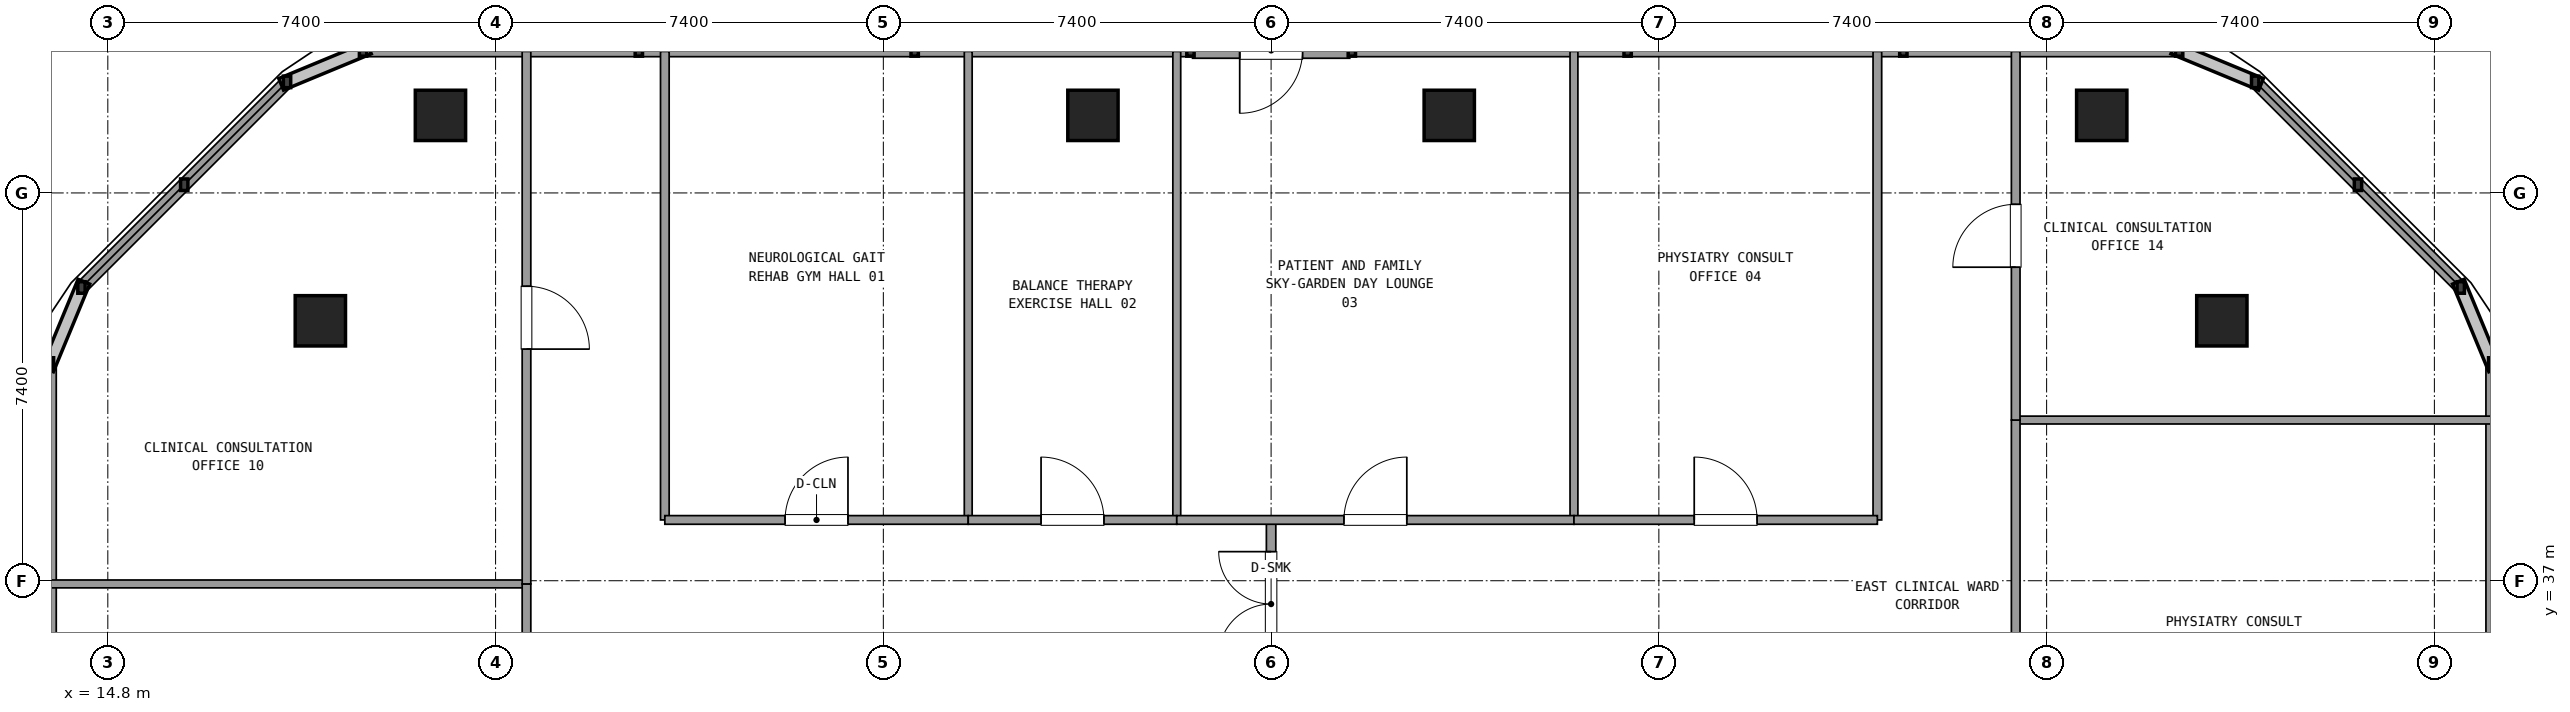
"""IFC4 building model, lengths in metres.
Left out: names, types, materials, properties, quantities, classifications, styles, units other than length and angle.
Written with IfcOpenShell. Run it as: python <this file> out.ifc"""

import sys

from ifc_helpers import new_model, si_unit, direction, frame, frame_2d, origin, origin_2d, place, context, subcontext, project, spatial, rectangle, extrude, element, fill, save


model = new_model("IFC4")
c1 = context("Model", 3, precision=1e-05, world=origin(), true_north=direction((0.0, 1.0)))
c2 = subcontext(c1, "Body", "Model", "MODEL_VIEW")
j1 = project(units=[si_unit("LENGTHUNIT", "METRE"), si_unit("PLANEANGLEUNIT", "RADIAN")], contexts=[c1])
p1 = place(None, origin())
s1 = spatial("IfcSite", under=j1, at=p1, CompositionType="ELEMENT")
p2 = place(p1, origin())
s2 = spatial("IfcBuilding", under=s1, at=p2, CompositionType="ELEMENT")
p3 = place(p2, frame((0.0, 0.0, 167.22)))
s3 = spatial("IfcBuildingStorey", under=s2, at=p3, CompositionType="ELEMENT", Elevation=167.22)
for number, where, z_axis, x_axis in (
    (1, (55.144, 41.96, 0.0), (0.0, 0.0, 1.0), (1.0, 0.0, 0.0)),
    (2, (52.852, 45.88, 0.0), (0.0, 0.0, 1.0), (1.0, 0.0, 0.0)),
    (3, (40.4, 45.88, 0.0), (0.0, 0.0, 1.0), (1.0, 0.0, 0.0)),
    (4, (33.6, 45.88, 0.0), (0.0, 0.0, 1.0), (1.0, 0.0, 0.0)),
    (5, (21.148, 45.88, 0.0), (0.0, 0.0, 1.0), (1.0, 0.0, 0.0)),
    (6, (18.856, 41.96, 0.0), (0.0, 0.0, 1.0), (1.0, 0.0, 0.0)),
):
    element("IfcColumn", number, at=place(p3, frame(where, z_axis=z_axis, x_axis=x_axis)), inside=s3, PredefinedType="COLUMN", context=c2, shape_type="SweptSolid", body=[
        extrude(rectangle(XDim=0.96, YDim=0.96, at=origin_2d()), origin(), (0.0, 0.0, 1.0), 3.6),
    ])
p4 = place(p3, frame((60.304, 10.655, 0.0), z_axis=(0.0, 0.0, 1.0), x_axis=(0.0, 1.0, 0.0)))
e7 = element("IfcWall", 7, at=p4, inside=s3, PredefinedType="SOLIDWALL", context=c2, shape_type="SweptSolid", body=[
    extrude(rectangle(XDim=30.49, YDim=0.24, at=frame_2d((15.245, 0.0))), origin(), (0.0, 0.0, 1.0), 0.85),
])
p5 = place(p3, frame((59.703, 42.596, 0.0), z_axis=(0.0, 0.0, 1.0), x_axis=(-0.707084777957, 0.707128783731, 0.0)))
e8 = element("IfcWall", 8, at=p5, inside=s3, PredefinedType="SOLIDWALL", context=c2, shape_type="SweptSolid", body=[
    extrude(rectangle(XDim=5.548, YDim=0.24, at=frame_2d((2.774, 0.0))), origin(), (0.0, 0.0, 1.0), 0.85),
])
p6 = place(p3, frame((38.501, 47.12, 0.0), z_axis=(0.0, 0.0, 1.0), x_axis=(-1.0, 0.0, 0.0)))
e9 = element("IfcWall", 9, at=p6, inside=s3, PredefinedType="SOLIDWALL", context=c2, shape_type="SweptSolid", body=[
    extrude(rectangle(XDim=3.0, YDim=0.3, at=frame_2d((1.5, 0.0))), origin(), (0.0, 0.0, 1.0), 2.67),
])
p7 = place(p6, frame((0.9, 0.0, 0.0)))
e10 = element("IfcOpeningElement", 10, at=p7, cuts=e9, PredefinedType="OPENING", context=c2, shape_type="SweptSolid", body=[
    extrude(rectangle(XDim=1.2, YDim=2.2, at=frame_2d((0.6, 1.1))), frame((0.0, 0.16, 0.0), z_axis=(0.0, -1.0, 0.0), x_axis=(1.0, 0.0, 0.0)), (0.0, 0.0, 1.0), 0.32),
])
p8 = place(p3, frame((54.329, 47.12, 0.0), z_axis=(0.0, 0.0, 1.0), x_axis=(-1.0, 0.0, 0.0)))
e11 = element("IfcWall", 11, at=p8, inside=s3, PredefinedType="SOLIDWALL", context=c2, shape_type="SweptSolid", body=[
    extrude(rectangle(XDim=15.788, YDim=0.24, at=frame_2d((7.894, 0.0))), origin(), (0.0, 0.0, 1.0), 0.85),
])
p9 = place(p3, frame((35.461, 47.12, 0.0), z_axis=(0.0, 0.0, 1.0), x_axis=(-1.0, 0.0, 0.0)))
e12 = element("IfcWall", 12, at=p9, inside=s3, PredefinedType="SOLIDWALL", context=c2, shape_type="SweptSolid", body=[
    extrude(rectangle(XDim=15.79, YDim=0.24, at=frame_2d((7.895, 0.0))), origin(), (0.0, 0.0, 1.0), 0.85),
])
p10 = place(p3, frame((18.22, 46.519, 0.0), z_axis=(0.0, 0.0, 1.0), x_axis=(-0.707084777957, -0.707128783731, 0.0)))
e13 = element("IfcWall", 13, at=p10, inside=s3, PredefinedType="SOLIDWALL", context=c2, shape_type="SweptSolid", body=[
    extrude(rectangle(XDim=5.548, YDim=0.24, at=frame_2d((2.774, 0.0))), origin(), (0.0, 0.0, 1.0), 0.85),
])
p11 = place(p3, frame((13.696, 41.145, 0.0), z_axis=(0.0, 0.0, 1.0), x_axis=(0.0, -1.0, 0.0)))
e14 = element("IfcWall", 14, at=p11, inside=s3, PredefinedType="SOLIDWALL", context=c2, shape_type="SweptSolid", body=[
    extrude(rectangle(XDim=30.49, YDim=0.24, at=frame_2d((15.245, 0.0))), origin(), (0.0, 0.0, 1.0), 0.85),
])
p12 = place(p3, frame((37.0, 34.95, 0.0), z_axis=(0.0, 0.0, 1.0), x_axis=(0.0, 1.0, 0.0)))
e15 = element("IfcWall", 15, at=p12, inside=s3, PredefinedType="PARTITIONING", context=c2, shape_type="SweptSolid", body=[
    extrude(rectangle(XDim=3.21, YDim=0.18, at=frame_2d((1.605, 0.0))), origin(), (0.0, 0.0, 1.0), 2.61),
])
p13 = place(p12, frame((0.605, 0.0, 0.0)))
e16 = element("IfcOpeningElement", 16, at=p13, cuts=e15, PredefinedType="OPENING", context=c2, shape_type="SweptSolid", body=[
    extrude(rectangle(XDim=2.0, YDim=2.2, at=frame_2d((1.0, 1.1))), frame((0.0, 0.1, 0.0), z_axis=(0.0, -1.0, 0.0), x_axis=(1.0, 0.0, 0.0)), (0.0, 0.0, 1.0), 0.2),
])
for number, where, z_axis, x_axis in (
    (17, (25.43, 38.16, 0.0), (0.0, 0.0, 1.0), (0.0, 1.0, 0.0)),
    (18, (48.57, 38.16, 0.0), (0.0, 0.0, 1.0), (0.0, 1.0, 0.0)),
):
    element("IfcWall", number, at=place(p3, frame(where, z_axis=z_axis, x_axis=x_axis)), inside=s3, PredefinedType="PARTITIONING", context=c2, shape_type="SweptSolid", body=[
        extrude(rectangle(XDim=8.94, YDim=0.165, at=frame_2d((4.47, 0.0))), origin(), (0.0, 0.0, 1.0), 2.61),
    ])
p14 = place(p3, frame((31.22, 38.16, 0.0), z_axis=(0.0, 0.0, 1.0), x_axis=(0.0, 1.0, 0.0)))
e19 = element("IfcWall", 19, at=p14, inside=s3, PredefinedType="PARTITIONING", context=c2, shape_type="SweptSolid", body=[
    extrude(rectangle(XDim=8.94, YDim=0.15, at=frame_2d((4.47, 0.0))), origin(), (0.0, 0.0, 1.0), 2.61),
])
p15 = place(p3, frame((25.43, 38.16, 0.0), z_axis=(0.0, 0.0, 1.0), x_axis=(1.0, 0.0, 0.0)))
e20 = element("IfcWall", 20, at=p15, inside=s3, PredefinedType="PARTITIONING", context=c2, shape_type="SweptSolid", body=[
    extrude(rectangle(XDim=5.79, YDim=0.165, at=frame_2d((2.895, 0.0))), origin(), (0.0, 0.0, 1.0), 2.61),
])
p16 = place(p15, frame((2.295, 0.0, 0.0)))
e21 = element("IfcOpeningElement", 21, at=p16, cuts=e20, PredefinedType="OPENING", context=c2, shape_type="SweptSolid", body=[
    extrude(rectangle(XDim=1.2, YDim=2.15, at=frame_2d((0.6, 1.075))), frame((0.0, 0.093, 0.0), z_axis=(0.0, -1.0, 0.0), x_axis=(1.0, 0.0, 0.0)), (0.0, 0.0, 1.0), 0.185),
])
p17 = place(p3, frame((35.2, 38.16, 0.0), z_axis=(0.0, 0.0, 1.0), x_axis=(0.0, 1.0, 0.0)))
e22 = element("IfcWall", 22, at=p17, inside=s3, PredefinedType="PARTITIONING", context=c2, shape_type="SweptSolid", body=[
    extrude(rectangle(XDim=8.94, YDim=0.15, at=frame_2d((4.47, 0.0))), origin(), (0.0, 0.0, 1.0), 2.61),
])
p18 = place(p3, frame((31.22, 38.16, 0.0), z_axis=(0.0, 0.0, 1.0), x_axis=(1.0, 0.0, 0.0)))
e23 = element("IfcWall", 23, at=p18, inside=s3, PredefinedType="PARTITIONING", context=c2, shape_type="SweptSolid", body=[
    extrude(rectangle(XDim=3.98, YDim=0.165, at=frame_2d((1.99, 0.0))), origin(), (0.0, 0.0, 1.0), 2.61),
])
p19 = place(p18, frame((1.39, 0.0, 0.0)))
e24 = element("IfcOpeningElement", 24, at=p19, cuts=e23, PredefinedType="OPENING", context=c2, shape_type="SweptSolid", body=[
    extrude(rectangle(XDim=1.2, YDim=2.15, at=frame_2d((0.6, 1.075))), frame((0.0, 0.093, 0.0), z_axis=(0.0, -1.0, 0.0), x_axis=(1.0, 0.0, 0.0)), (0.0, 0.0, 1.0), 0.185),
])
p20 = place(p3, frame((42.78, 38.16, 0.0), z_axis=(0.0, 0.0, 1.0), x_axis=(0.0, 1.0, 0.0)))
e25 = element("IfcWall", 25, at=p20, inside=s3, PredefinedType="PARTITIONING", context=c2, shape_type="SweptSolid", body=[
    extrude(rectangle(XDim=8.94, YDim=0.15, at=frame_2d((4.47, 0.0))), origin(), (0.0, 0.0, 1.0), 2.61),
])
p21 = place(p3, frame((35.2, 38.16, 0.0), z_axis=(0.0, 0.0, 1.0), x_axis=(1.0, 0.0, 0.0)))
e26 = element("IfcWall", 26, at=p21, inside=s3, PredefinedType="PARTITIONING", context=c2, shape_type="SweptSolid", body=[
    extrude(rectangle(XDim=7.58, YDim=0.165, at=frame_2d((3.79, 0.0))), origin(), (0.0, 0.0, 1.0), 2.61),
])
p22 = place(p21, frame((3.19, 0.0, 0.0)))
e27 = element("IfcOpeningElement", 27, at=p22, cuts=e26, PredefinedType="OPENING", context=c2, shape_type="SweptSolid", body=[
    extrude(rectangle(XDim=1.2, YDim=2.15, at=frame_2d((0.6, 1.075))), frame((0.0, 0.093, 0.0), z_axis=(0.0, -1.0, 0.0), x_axis=(1.0, 0.0, 0.0)), (0.0, 0.0, 1.0), 0.185),
])
p23 = place(p3, frame((42.78, 38.16, 0.0), z_axis=(0.0, 0.0, 1.0), x_axis=(1.0, 0.0, 0.0)))
e28 = element("IfcWall", 28, at=p23, inside=s3, PredefinedType="PARTITIONING", context=c2, shape_type="SweptSolid", body=[
    extrude(rectangle(XDim=5.79, YDim=0.165, at=frame_2d((2.895, 0.0))), origin(), (0.0, 0.0, 1.0), 2.61),
])
p24 = place(p23, frame((2.295, 0.0, 0.0)))
e29 = element("IfcOpeningElement", 29, at=p24, cuts=e28, PredefinedType="OPENING", context=c2, shape_type="SweptSolid", body=[
    extrude(rectangle(XDim=1.2, YDim=2.15, at=frame_2d((0.6, 1.075))), frame((0.0, 0.093, 0.0), z_axis=(0.0, -1.0, 0.0), x_axis=(1.0, 0.0, 0.0)), (0.0, 0.0, 1.0), 0.185),
])
p25 = place(p3, frame((22.79, 36.939, 0.0), z_axis=(0.0, 0.0, 1.0), x_axis=(-1.0, 0.0, 0.0)))
e30 = element("IfcWall", 30, at=p25, inside=s3, PredefinedType="PARTITIONING", context=c2, shape_type="SweptSolid", body=[
    extrude(rectangle(XDim=9.074, YDim=0.15, at=frame_2d((4.537, 0.0))), origin(), (0.0, 0.0, 1.0), 2.61),
])
p26 = place(p3, frame((22.79, 27.56, 0.0), z_axis=(0.0, 0.0, 1.0), x_axis=(0.0, 1.0, 0.0)))
e31 = element("IfcWall", 31, at=p26, inside=s3, PredefinedType="PARTITIONING", context=c2, shape_type="SweptSolid", body=[
    extrude(rectangle(XDim=9.379, YDim=0.165, at=frame_2d((4.689, 0.0))), origin(), (0.0, 0.0, 1.0), 2.61),
])
p27 = place(p26, frame((4.09, 0.0, 0.0)))
e32 = element("IfcOpeningElement", 32, at=p27, cuts=e31, PredefinedType="OPENING", context=c2, shape_type="SweptSolid", body=[
    extrude(rectangle(XDim=1.2, YDim=2.15, at=frame_2d((0.6, 1.075))), frame((0.0, 0.093, 0.0), z_axis=(0.0, -1.0, 0.0), x_axis=(1.0, 0.0, 0.0)), (0.0, 0.0, 1.0), 0.185),
])
p28 = place(p3, frame((22.79, 36.939, 0.0), z_axis=(0.0, 0.0, 1.0), x_axis=(0.0, 1.0, 0.0)))
e33 = element("IfcWall", 33, at=p28, inside=s3, PredefinedType="PARTITIONING", context=c2, shape_type="SweptSolid", body=[
    extrude(rectangle(XDim=10.161, YDim=0.165, at=frame_2d((5.081, 0.0))), origin(), (0.0, 0.0, 1.0), 2.61),
])
p29 = place(p28, frame((4.481, 0.0, 0.0)))
e34 = element("IfcOpeningElement", 34, at=p29, cuts=e33, PredefinedType="OPENING", context=c2, shape_type="SweptSolid", body=[
    extrude(rectangle(XDim=1.2, YDim=2.15, at=frame_2d((0.6, 1.075))), frame((0.0, 0.093, 0.0), z_axis=(0.0, -1.0, 0.0), x_axis=(1.0, 0.0, 0.0)), (0.0, 0.0, 1.0), 0.185),
])
p30 = place(p3, frame((51.21, 40.066, 0.0), z_axis=(0.0, 0.0, 1.0), x_axis=(1.0, 0.0, 0.0)))
e35 = element("IfcWall", 35, at=p30, inside=s3, PredefinedType="PARTITIONING", context=c2, shape_type="SweptSolid", body=[
    extrude(rectangle(XDim=9.074, YDim=0.15, at=frame_2d((4.537, 0.0))), origin(), (0.0, 0.0, 1.0), 2.61),
])
p31 = place(p3, frame((51.21, 27.56, 0.0), z_axis=(0.0, 0.0, 1.0), x_axis=(0.0, 1.0, 0.0)))
e36 = element("IfcWall", 36, at=p31, inside=s3, PredefinedType="PARTITIONING", context=c2, shape_type="SweptSolid", body=[
    extrude(rectangle(XDim=12.506, YDim=0.165, at=frame_2d((6.253, 0.0))), origin(), (0.0, 0.0, 1.0), 2.61),
])
p32 = place(p31, frame((5.653, 0.0, 0.0)))
e37 = element("IfcOpeningElement", 37, at=p32, cuts=e36, PredefinedType="OPENING", context=c2, shape_type="SweptSolid", body=[
    extrude(rectangle(XDim=1.2, YDim=2.15, at=frame_2d((0.6, 1.075))), frame((0.0, 0.093, 0.0), z_axis=(0.0, -1.0, 0.0), x_axis=(1.0, 0.0, 0.0)), (0.0, 0.0, 1.0), 0.185),
])
p33 = place(p3, frame((51.21, 40.066, 0.0), z_axis=(0.0, 0.0, 1.0), x_axis=(0.0, 1.0, 0.0)))
e38 = element("IfcWall", 38, at=p33, inside=s3, PredefinedType="PARTITIONING", context=c2, shape_type="SweptSolid", body=[
    extrude(rectangle(XDim=7.034, YDim=0.165, at=frame_2d((3.517, 0.0))), origin(), (0.0, 0.0, 1.0), 2.61),
])
p34 = place(p33, frame((2.917, 0.0, 0.0)))
e39 = element("IfcOpeningElement", 39, at=p34, cuts=e38, PredefinedType="OPENING", context=c2, shape_type="SweptSolid", body=[
    extrude(rectangle(XDim=1.2, YDim=2.15, at=frame_2d((0.6, 1.075))), frame((0.0, 0.093, 0.0), z_axis=(0.0, -1.0, 0.0), x_axis=(1.0, 0.0, 0.0)), (0.0, 0.0, 1.0), 0.185),
])
p35 = place(p13, origin())
e40 = element("IfcDoor", 40, at=p35, inside=s3, OperationType="DOUBLE_DOOR_SINGLE_SWING", PredefinedType="DOOR", context=c2, shape_type="SweptSolid", body=[
    extrude(rectangle(XDim=2.0, YDim=2.2, at=frame_2d((1.0, 1.1))), frame((0.0, 0.025, 0.0), z_axis=(0.0, -1.0, 0.0), x_axis=(1.0, 0.0, 0.0)), (0.0, 0.0, 1.0), 0.05),
])
fill(e16, e40)
p36 = place(p16, origin())
e41 = element("IfcDoor", 41, at=p36, inside=s3, OperationType="SINGLE_SWING_RIGHT", PredefinedType="DOOR", context=c2, shape_type="SweptSolid", body=[
    extrude(rectangle(XDim=1.2, YDim=2.15, at=frame_2d((0.6, 1.075))), frame((0.0, 0.025, 0.0), z_axis=(0.0, -1.0, 0.0), x_axis=(1.0, 0.0, 0.0)), (0.0, 0.0, 1.0), 0.05),
])
fill(e21, e41)
p37 = place(p19, origin())
e42 = element("IfcDoor", 42, at=p37, inside=s3, OperationType="SINGLE_SWING_LEFT", PredefinedType="DOOR", context=c2, shape_type="SweptSolid", body=[
    extrude(rectangle(XDim=1.2, YDim=2.15, at=frame_2d((0.6, 1.075))), frame((0.0, 0.025, 0.0), z_axis=(0.0, -1.0, 0.0), x_axis=(1.0, 0.0, 0.0)), (0.0, 0.0, 1.0), 0.05),
])
fill(e24, e42)
p38 = place(p22, origin())
e43 = element("IfcDoor", 43, at=p38, inside=s3, OperationType="SINGLE_SWING_RIGHT", PredefinedType="DOOR", context=c2, shape_type="SweptSolid", body=[
    extrude(rectangle(XDim=1.2, YDim=2.15, at=frame_2d((0.6, 1.075))), frame((0.0, 0.025, 0.0), z_axis=(0.0, -1.0, 0.0), x_axis=(1.0, 0.0, 0.0)), (0.0, 0.0, 1.0), 0.05),
])
fill(e27, e43)
p39 = place(p24, origin())
e44 = element("IfcDoor", 44, at=p39, inside=s3, OperationType="SINGLE_SWING_LEFT", PredefinedType="DOOR", context=c2, shape_type="SweptSolid", body=[
    extrude(rectangle(XDim=1.2, YDim=2.15, at=frame_2d((0.6, 1.075))), frame((0.0, 0.025, 0.0), z_axis=(0.0, -1.0, 0.0), x_axis=(1.0, 0.0, 0.0)), (0.0, 0.0, 1.0), 0.05),
])
fill(e29, e44)
p40 = place(p29, frame((1.2, 0.0, 0.0), z_axis=(0.0, 0.0, 1.0), x_axis=(-1.0, 0.0, 0.0)))
e45 = element("IfcDoor", 45, at=p40, inside=s3, OperationType="SINGLE_SWING_LEFT", PredefinedType="DOOR", context=c2, shape_type="SweptSolid", body=[
    extrude(rectangle(XDim=1.2, YDim=2.15, at=frame_2d((0.6, 1.075))), frame((0.0, 0.025, 0.0), z_axis=(0.0, -1.0, 0.0), x_axis=(1.0, 0.0, 0.0)), (0.0, 0.0, 1.0), 0.05),
])
fill(e34, e45)
p41 = place(p34, origin())
e46 = element("IfcDoor", 46, at=p41, inside=s3, OperationType="SINGLE_SWING_LEFT", PredefinedType="DOOR", context=c2, shape_type="SweptSolid", body=[
    extrude(rectangle(XDim=1.2, YDim=2.15, at=frame_2d((0.6, 1.075))), frame((0.0, 0.025, 0.0), z_axis=(0.0, -1.0, 0.0), x_axis=(1.0, 0.0, 0.0)), (0.0, 0.0, 1.0), 0.05),
])
fill(e39, e46)
save(model, sys.argv[1])
